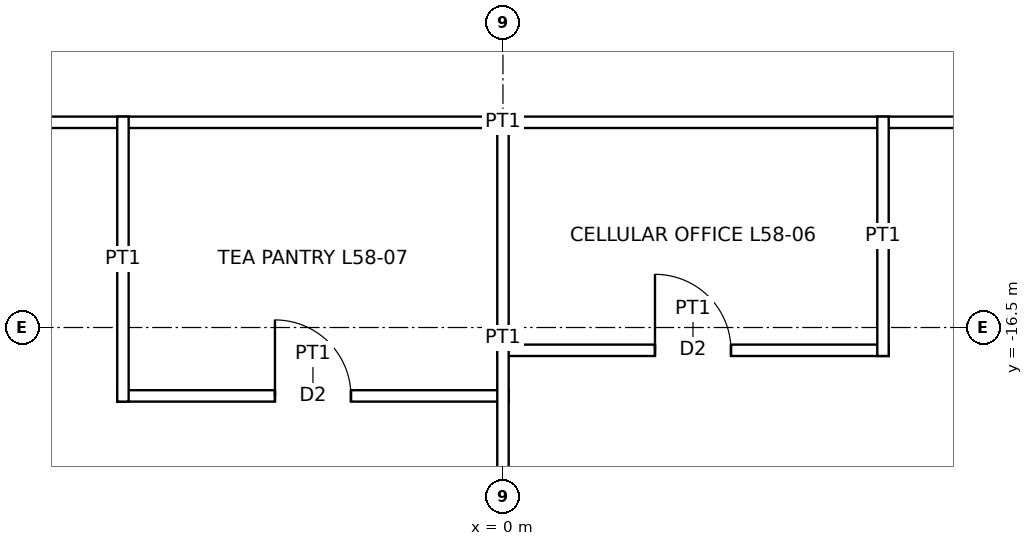
"""IFC4 building model, lengths in metres.
Left out: names, types, materials, properties, quantities, classifications, styles, units other than length and angle.
Written with IfcOpenShell. Run it as: python <this file> out.ifc"""

import sys

from ifc_helpers import new_model, si_unit, direction, frame, frame_2d, origin, place, context, subcontext, project, spatial, rectangle, extrude, element, fill, save


model = new_model("IFC4")
c1 = context("Model", 3, precision=1e-05, world=origin(), true_north=direction((0.0, 1.0)))
c2 = subcontext(c1, "Body", "Model", "MODEL_VIEW")
j1 = project(units=[si_unit("LENGTHUNIT", "METRE"), si_unit("PLANEANGLEUNIT", "RADIAN")], contexts=[c1])
p1 = place(None, origin())
s1 = spatial("IfcSite", under=j1, at=p1, CompositionType="ELEMENT")
p2 = place(p1, origin())
s2 = spatial("IfcBuilding", under=s1, at=p2, CompositionType="ELEMENT")
p3 = place(p2, frame((0.0, 0.0, 267.9)))
s3 = spatial("IfcBuildingStorey", under=s2, at=p3, CompositionType="ELEMENT", Elevation=267.9)
p4 = place(p3, frame((-5.075, -17.4, 0.0), z_axis=(0.0, 0.0, 1.0), x_axis=(1.0, 0.0, 0.0)))
e1 = element("IfcWall", 1, at=p4, inside=s3, PredefinedType="PARTITIONING", context=c2, shape_type="SweptSolid", body=[
    extrude(rectangle(XDim=5.15, YDim=0.15, at=frame_2d((2.575, 0.0))), origin(), (0.0, 0.0, 1.0), 3.85),
])
p5 = place(p4, frame((2.075, 0.0, 0.0)))
e2 = element("IfcOpeningElement", 2, at=p5, cuts=e1, PredefinedType="OPENING", context=c2, shape_type="SweptSolid", body=[
    extrude(rectangle(XDim=1.0, YDim=2.1, at=frame_2d((0.5, 1.05))), frame((0.0, 0.085, 0.0), z_axis=(0.0, -1.0, 0.0), x_axis=(1.0, 0.0, 0.0)), (0.0, 0.0, 1.0), 0.17),
])
p6 = place(p3, frame((-0.075, -16.8, 0.0), z_axis=(0.0, 0.0, 1.0), x_axis=(1.0, 0.0, 0.0)))
e3 = element("IfcWall", 3, at=p6, inside=s3, PredefinedType="PARTITIONING", context=c2, shape_type="SweptSolid", body=[
    extrude(rectangle(XDim=5.15, YDim=0.15, at=frame_2d((2.575, 0.0))), origin(), (0.0, 0.0, 1.0), 3.85),
])
p7 = place(p6, frame((2.075, 0.0, 0.0)))
e4 = element("IfcOpeningElement", 4, at=p7, cuts=e3, PredefinedType="OPENING", context=c2, shape_type="SweptSolid", body=[
    extrude(rectangle(XDim=1.0, YDim=2.1, at=frame_2d((0.5, 1.05))), frame((0.0, 0.085, 0.0), z_axis=(0.0, -1.0, 0.0), x_axis=(1.0, 0.0, 0.0)), (0.0, 0.0, 1.0), 0.17),
])
p8 = place(p3, frame((-13.875, -13.8, 0.0), z_axis=(0.0, 0.0, 1.0), x_axis=(1.0, 0.0, 0.0)))
e5 = element("IfcWall", 5, at=p8, inside=s3, PredefinedType="PARTITIONING", context=c2, shape_type="SweptSolid", body=[
    extrude(rectangle(XDim=27.75, YDim=0.15, at=frame_2d((13.875, 0.0))), origin(), (0.0, 0.0, 1.0), 3.85),
])
p9 = place(p8, frame((3.975, 0.0, 0.0)))
e6 = element("IfcOpeningElement", 6, at=p9, cuts=e5, PredefinedType="OPENING", context=c2, shape_type="SweptSolid", body=[
    extrude(rectangle(XDim=1.0, YDim=2.4, at=frame_2d((0.5, 1.2))), frame((0.0, 0.085, 0.0), z_axis=(0.0, -1.0, 0.0), x_axis=(1.0, 0.0, 0.0)), (0.0, 0.0, 1.0), 0.17),
])
p10 = place(p3, frame((-5.0, -17.475, 0.0), z_axis=(0.0, 0.0, 1.0), x_axis=(0.0, 1.0, 0.0)))
e7 = element("IfcWall", 7, at=p10, inside=s3, PredefinedType="PARTITIONING", context=c2, shape_type="SweptSolid", body=[
    extrude(rectangle(XDim=3.75, YDim=0.15, at=frame_2d((1.875, 0.0))), origin(), (0.0, 0.0, 1.0), 3.85),
])
p11 = place(p3, frame((0.0, -19.54, 0.0), z_axis=(0.0, 0.0, 1.0), x_axis=(0.0, 1.0, 0.0)))
e8 = element("IfcWall", 8, at=p11, inside=s3, PredefinedType="PARTITIONING", context=c2, shape_type="SweptSolid", body=[
    extrude(rectangle(XDim=5.815, YDim=0.15, at=frame_2d((2.907, 0.0))), origin(), (0.0, 0.0, 1.0), 3.243),
])
p12 = place(p3, frame((5.0, -16.875, 0.0), z_axis=(0.0, 0.0, 1.0), x_axis=(0.0, 1.0, 0.0)))
e9 = element("IfcWall", 9, at=p12, inside=s3, PredefinedType="PARTITIONING", context=c2, shape_type="SweptSolid", body=[
    extrude(rectangle(XDim=3.15, YDim=0.15, at=frame_2d((1.575, 0.0))), origin(), (0.0, 0.0, 1.0), 3.85),
])
p13 = place(p7, origin())
e10 = element("IfcDoor", 10, at=p13, inside=s3, OperationType="SINGLE_SWING_LEFT", PredefinedType="DOOR", context=c2, shape_type="SweptSolid", body=[
    extrude(rectangle(XDim=1.0, YDim=2.1, at=frame_2d((0.5, 1.05))), frame((0.0, 0.025, 0.0), z_axis=(0.0, -1.0, 0.0), x_axis=(1.0, 0.0, 0.0)), (0.0, 0.0, 1.0), 0.05),
])
fill(e4, e10)
p14 = place(p5, origin())
e11 = element("IfcDoor", 11, at=p14, inside=s3, OperationType="SINGLE_SWING_LEFT", PredefinedType="DOOR", context=c2, shape_type="SweptSolid", body=[
    extrude(rectangle(XDim=1.0, YDim=2.1, at=frame_2d((0.5, 1.05))), frame((0.0, 0.025, 0.0), z_axis=(0.0, -1.0, 0.0), x_axis=(1.0, 0.0, 0.0)), (0.0, 0.0, 1.0), 0.05),
])
fill(e2, e11)
save(model, sys.argv[1])
